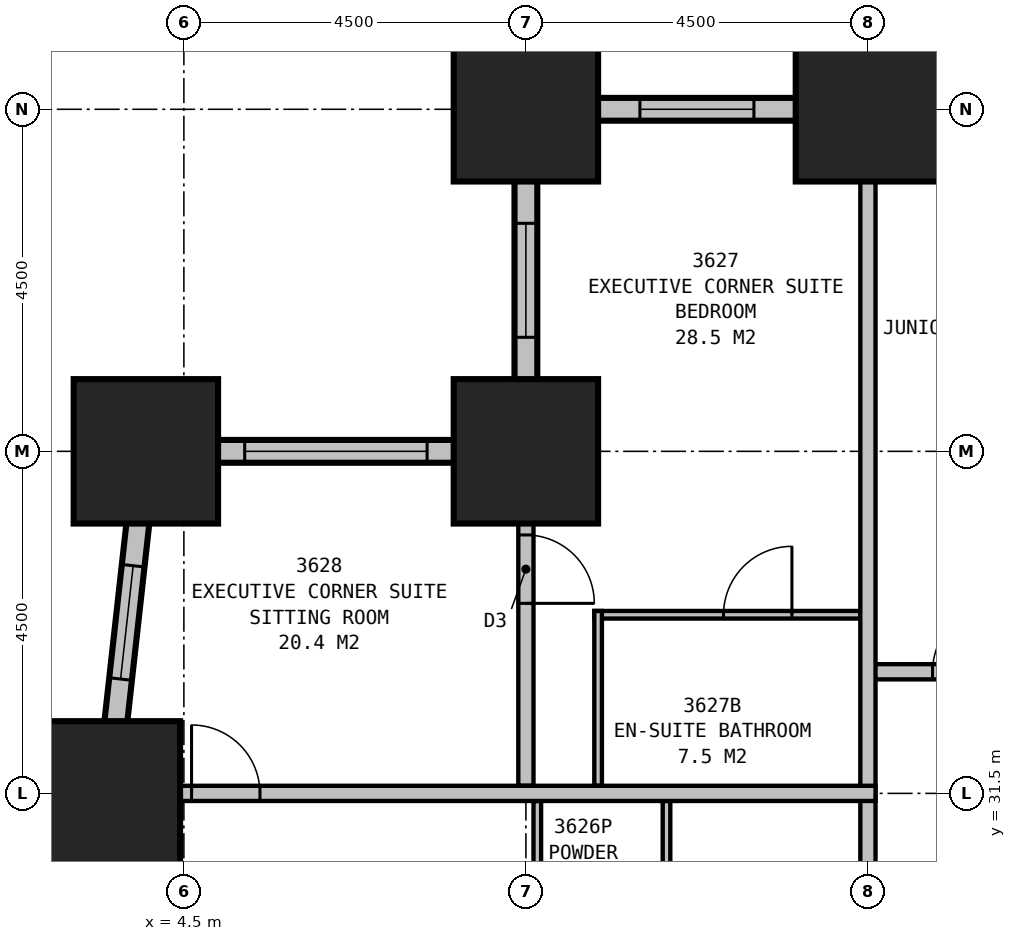
"""IFC4 building model, lengths in metres.
Left out: names, types, materials, properties, quantities, classifications, styles, units other than length and angle.
Written with IfcOpenShell. Run it as: python <this file> out.ifc"""

import sys

from ifc_helpers import new_model, si_unit, direction, frame, frame_2d, origin, origin_2d, place, context, subcontext, project, spatial, rectangle, extrude, element, fill, save


model = new_model("IFC4")
c1 = context("Model", 3, precision=1e-05, world=origin(), true_north=direction((0.0, 1.0)))
c2 = subcontext(c1, "Body", "Model", "MODEL_VIEW")
j1 = project(units=[si_unit("LENGTHUNIT", "METRE"), si_unit("PLANEANGLEUNIT", "RADIAN")], contexts=[c1])
p1 = place(None, origin())
s1 = spatial("IfcSite", under=j1, at=p1, CompositionType="ELEMENT")
p2 = place(p1, origin())
s2 = spatial("IfcBuilding", under=s1, at=p2, CompositionType="ELEMENT")
p3 = place(p2, frame((0.0, 0.0, 138.9)))
s3 = spatial("IfcBuildingStorey", under=s2, at=p3, CompositionType="ELEMENT", Elevation=138.9)
for number, where, z_axis, x_axis in (
    (1, (13.5, 40.5, 0.0), (0.0, 0.0, 1.0), (1.0, 0.0, 0.0)),
    (2, (9.0, 40.5, 0.0), (0.0, 0.0, 1.0), (1.0, 0.0, 0.0)),
    (3, (9.0, 36.0, 0.0), (0.0, 0.0, 1.0), (1.0, 0.0, 0.0)),
    (4, (4.0, 36.0, 0.0), (0.0, 0.0, 1.0), (1.0, 0.0, 0.0)),
    (5, (3.5, 31.5, 0.0), (0.0, 0.0, 1.0), (1.0, 0.0, 0.0)),
):
    element("IfcColumn", number, at=place(p3, frame(where, z_axis=z_axis, x_axis=x_axis)), inside=s3, PredefinedType="COLUMN", context=c2, shape_type="SweptSolid", body=[
        extrude(rectangle(XDim=1.9, YDim=1.9, at=origin_2d()), origin(), (0.0, 0.0, 1.0), 3.5),
    ])
p4 = place(p3, frame((40.65, 40.5, 0.0), z_axis=(0.0, 0.0, 1.0), x_axis=(-1.0, 0.0, 0.0)))
e6 = element("IfcWall", 6, at=p4, inside=s3, PredefinedType="STANDARD", context=c2, shape_type="SweptSolid", body=[
    extrude(rectangle(XDim=31.8, YDim=0.3, at=frame_2d((15.9, 0.0))), origin(), (0.0, 0.0, 1.0), 2.15),
])
p5 = place(p4, frame((1.65, 0.0, 0.5)))
e7 = element("IfcOpeningElement", 7, at=p5, cuts=e6, PredefinedType="OPENING", context=c2, shape_type="SweptSolid", body=[
    extrude(rectangle(XDim=1.5, YDim=1.5, at=frame_2d((0.75, 0.75))), frame((0.0, 0.16, 0.0), z_axis=(0.0, -1.0, 0.0), x_axis=(1.0, 0.0, 0.0)), (0.0, 0.0, 1.0), 0.32),
])
p6 = place(p4, frame((6.15, 0.0, 0.5)))
e8 = element("IfcOpeningElement", 8, at=p6, cuts=e6, PredefinedType="OPENING", context=c2, shape_type="SweptSolid", body=[
    extrude(rectangle(XDim=1.5, YDim=1.5, at=frame_2d((0.75, 0.75))), frame((0.0, 0.16, 0.0), z_axis=(0.0, -1.0, 0.0), x_axis=(1.0, 0.0, 0.0)), (0.0, 0.0, 1.0), 0.32),
])
p7 = place(p4, frame((10.65, 0.0, 0.5)))
e9 = element("IfcOpeningElement", 9, at=p7, cuts=e6, PredefinedType="OPENING", context=c2, shape_type="SweptSolid", body=[
    extrude(rectangle(XDim=1.5, YDim=1.5, at=frame_2d((0.75, 0.75))), frame((0.0, 0.16, 0.0), z_axis=(0.0, -1.0, 0.0), x_axis=(1.0, 0.0, 0.0)), (0.0, 0.0, 1.0), 0.32),
])
p8 = place(p4, frame((15.15, 0.0, 0.5)))
e10 = element("IfcOpeningElement", 10, at=p8, cuts=e6, PredefinedType="OPENING", context=c2, shape_type="SweptSolid", body=[
    extrude(rectangle(XDim=1.5, YDim=1.5, at=frame_2d((0.75, 0.75))), frame((0.0, 0.16, 0.0), z_axis=(0.0, -1.0, 0.0), x_axis=(1.0, 0.0, 0.0)), (0.0, 0.0, 1.0), 0.32),
])
p9 = place(p4, frame((19.65, 0.0, 0.5)))
e11 = element("IfcOpeningElement", 11, at=p9, cuts=e6, PredefinedType="OPENING", context=c2, shape_type="SweptSolid", body=[
    extrude(rectangle(XDim=1.5, YDim=1.5, at=frame_2d((0.75, 0.75))), frame((0.0, 0.16, 0.0), z_axis=(0.0, -1.0, 0.0), x_axis=(1.0, 0.0, 0.0)), (0.0, 0.0, 1.0), 0.32),
])
p10 = place(p4, frame((24.15, 0.0, 0.5)))
e12 = element("IfcOpeningElement", 12, at=p10, cuts=e6, PredefinedType="OPENING", context=c2, shape_type="SweptSolid", body=[
    extrude(rectangle(XDim=1.5, YDim=1.5, at=frame_2d((0.75, 0.75))), frame((0.0, 0.16, 0.0), z_axis=(0.0, -1.0, 0.0), x_axis=(1.0, 0.0, 0.0)), (0.0, 0.0, 1.0), 0.32),
])
p11 = place(p4, frame((28.65, 0.0, 0.5)))
e13 = element("IfcOpeningElement", 13, at=p11, cuts=e6, PredefinedType="OPENING", context=c2, shape_type="SweptSolid", body=[
    extrude(rectangle(XDim=1.5, YDim=1.5, at=frame_2d((0.75, 0.75))), frame((0.0, 0.16, 0.0), z_axis=(0.0, -1.0, 0.0), x_axis=(1.0, 0.0, 0.0)), (0.0, 0.0, 1.0), 0.32),
])
p12 = place(p3, frame((9.0, 40.65, 0.0), z_axis=(0.0, 0.0, 1.0), x_axis=(0.0, -1.0, 0.0)))
e14 = element("IfcWall", 14, at=p12, inside=s3, PredefinedType="STANDARD", context=c2, shape_type="SweptSolid", body=[
    extrude(rectangle(XDim=4.8, YDim=0.3, at=frame_2d((2.4, 0.0))), origin(), (0.0, 0.0, 1.0), 2.15),
])
p13 = place(p12, frame((1.65, 0.0, 0.5)))
e15 = element("IfcOpeningElement", 15, at=p13, cuts=e14, PredefinedType="OPENING", context=c2, shape_type="SweptSolid", body=[
    extrude(rectangle(XDim=1.5, YDim=1.5, at=frame_2d((0.75, 0.75))), frame((0.0, 0.16, 0.0), z_axis=(0.0, -1.0, 0.0), x_axis=(1.0, 0.0, 0.0)), (0.0, 0.0, 1.0), 0.32),
])
p14 = place(p3, frame((9.15, 36.0, 0.0), z_axis=(0.0, 0.0, 1.0), x_axis=(-1.0, 0.0, 0.0)))
e16 = element("IfcWall", 16, at=p14, inside=s3, PredefinedType="STANDARD", context=c2, shape_type="SweptSolid", body=[
    extrude(rectangle(XDim=5.3, YDim=0.3, at=frame_2d((2.65, 0.0))), origin(), (0.0, 0.0, 1.0), 2.15),
])
p15 = place(p14, frame((1.45, 0.0, 0.5)))
e17 = element("IfcOpeningElement", 17, at=p15, cuts=e16, PredefinedType="OPENING", context=c2, shape_type="SweptSolid", body=[
    extrude(rectangle(XDim=2.4, YDim=1.5, at=frame_2d((1.2, 0.75))), frame((0.0, 0.16, 0.0), z_axis=(0.0, -1.0, 0.0), x_axis=(1.0, 0.0, 0.0)), (0.0, 0.0, 1.0), 0.32),
])
p16 = place(p3, frame((4.017, 36.149, 0.0), z_axis=(0.0, 0.0, 1.0), x_axis=(-0.110433201132, -0.993883548555, 0.0)))
e18 = element("IfcWall", 18, at=p16, inside=s3, PredefinedType="STANDARD", context=c2, shape_type="SweptSolid", body=[
    extrude(rectangle(XDim=31.994, YDim=0.3, at=frame_2d((15.997, 0.0))), origin(), (0.0, 0.0, 1.0), 2.15),
])
p17 = place(p16, frame((1.664, 0.0, 0.5)))
e19 = element("IfcOpeningElement", 19, at=p17, cuts=e18, PredefinedType="OPENING", context=c2, shape_type="SweptSolid", body=[
    extrude(rectangle(XDim=1.5, YDim=1.5, at=frame_2d((0.75, 0.75))), frame((0.0, 0.16, 0.0), z_axis=(0.0, -1.0, 0.0), x_axis=(1.0, 0.0, 0.0)), (0.0, 0.0, 1.0), 0.32),
])
p18 = place(p16, frame((6.192, 0.0, 0.5)))
e20 = element("IfcOpeningElement", 20, at=p18, cuts=e18, PredefinedType="OPENING", context=c2, shape_type="SweptSolid", body=[
    extrude(rectangle(XDim=1.5, YDim=1.5, at=frame_2d((0.75, 0.75))), frame((0.0, 0.16, 0.0), z_axis=(0.0, -1.0, 0.0), x_axis=(1.0, 0.0, 0.0)), (0.0, 0.0, 1.0), 0.32),
])
p19 = place(p16, frame((10.719, 0.0, 0.5)))
e21 = element("IfcOpeningElement", 21, at=p19, cuts=e18, PredefinedType="OPENING", context=c2, shape_type="SweptSolid", body=[
    extrude(rectangle(XDim=1.5, YDim=1.5, at=frame_2d((0.75, 0.75))), frame((0.0, 0.16, 0.0), z_axis=(0.0, -1.0, 0.0), x_axis=(1.0, 0.0, 0.0)), (0.0, 0.0, 1.0), 0.32),
])
p20 = place(p16, frame((15.247, 0.0, 0.5)))
e22 = element("IfcOpeningElement", 22, at=p20, cuts=e18, PredefinedType="OPENING", context=c2, shape_type="SweptSolid", body=[
    extrude(rectangle(XDim=1.5, YDim=1.5, at=frame_2d((0.75, 0.75))), frame((0.0, 0.16, 0.0), z_axis=(0.0, -1.0, 0.0), x_axis=(1.0, 0.0, 0.0)), (0.0, 0.0, 1.0), 0.32),
])
p21 = place(p16, frame((19.775, 0.0, 0.5)))
e23 = element("IfcOpeningElement", 23, at=p21, cuts=e18, PredefinedType="OPENING", context=c2, shape_type="SweptSolid", body=[
    extrude(rectangle(XDim=1.5, YDim=1.5, at=frame_2d((0.75, 0.75))), frame((0.0, 0.16, 0.0), z_axis=(0.0, -1.0, 0.0), x_axis=(1.0, 0.0, 0.0)), (0.0, 0.0, 1.0), 0.32),
])
p22 = place(p16, frame((24.302, 0.0, 0.5)))
e24 = element("IfcOpeningElement", 24, at=p22, cuts=e18, PredefinedType="OPENING", context=c2, shape_type="SweptSolid", body=[
    extrude(rectangle(XDim=1.5, YDim=1.5, at=frame_2d((0.75, 0.75))), frame((0.0, 0.16, 0.0), z_axis=(0.0, -1.0, 0.0), x_axis=(1.0, 0.0, 0.0)), (0.0, 0.0, 1.0), 0.32),
])
p23 = place(p16, frame((28.83, 0.0, 0.5)))
e25 = element("IfcOpeningElement", 25, at=p23, cuts=e18, PredefinedType="OPENING", context=c2, shape_type="SweptSolid", body=[
    extrude(rectangle(XDim=1.5, YDim=1.5, at=frame_2d((0.75, 0.75))), frame((0.0, 0.16, 0.0), z_axis=(0.0, -1.0, 0.0), x_axis=(1.0, 0.0, 0.0)), (0.0, 0.0, 1.0), 0.32),
])
p24 = place(p3, frame((13.5, 33.1, 0.0), z_axis=(0.0, 0.0, 1.0), x_axis=(1.0, 0.0, 0.0)))
e26 = element("IfcWall", 26, at=p24, inside=s3, PredefinedType="PARTITIONING", context=c2, shape_type="SweptSolid", body=[
    extrude(rectangle(XDim=22.5, YDim=0.2, at=frame_2d((11.25, 0.0))), origin(), (0.0, 0.0, 1.0), 3.25),
])
p25 = place(p24, frame((0.85, 0.0, 0.0)))
e27 = element("IfcOpeningElement", 27, at=p25, cuts=e26, PredefinedType="OPENING", context=c2, shape_type="SweptSolid", body=[
    extrude(rectangle(XDim=0.9, YDim=2.1, at=frame_2d((0.45, 1.05))), frame((0.0, 0.11, 0.0), z_axis=(0.0, -1.0, 0.0), x_axis=(1.0, 0.0, 0.0)), (0.0, 0.0, 1.0), 0.22),
])
p26 = place(p24, frame((10.7, 0.0, 0.0)))
e28 = element("IfcOpeningElement", 28, at=p26, cuts=e26, PredefinedType="OPENING", context=c2, shape_type="SweptSolid", body=[
    extrude(rectangle(XDim=1.0, YDim=2.1, at=frame_2d((0.5, 1.05))), frame((0.0, 0.11, 0.0), z_axis=(0.0, -1.0, 0.0), x_axis=(1.0, 0.0, 0.0)), (0.0, 0.0, 1.0), 0.22),
])
p27 = place(p24, frame((15.15, 0.0, 0.0)))
e29 = element("IfcOpeningElement", 29, at=p27, cuts=e26, PredefinedType="OPENING", context=c2, shape_type="SweptSolid", body=[
    extrude(rectangle(XDim=0.9, YDim=2.1, at=frame_2d((0.45, 1.05))), frame((0.0, 0.11, 0.0), z_axis=(0.0, -1.0, 0.0), x_axis=(1.0, 0.0, 0.0)), (0.0, 0.0, 1.0), 0.22),
])
p28 = place(p3, frame((13.5, 29.3, 0.0), z_axis=(0.0, 0.0, 1.0), x_axis=(0.0, 1.0, 0.0)))
e30 = element("IfcWall", 30, at=p28, inside=s3, PredefinedType="PARTITIONING", context=c2, shape_type="SweptSolid", body=[
    extrude(rectangle(XDim=11.2, YDim=0.2, at=frame_2d((5.6, 0.0))), origin(), (0.0, 0.0, 1.0), 2.25),
])
p29 = place(p3, frame((13.6, 31.5, 0.0), z_axis=(0.0, 0.0, 1.0), x_axis=(-1.0, 0.0, 0.0)))
e31 = element("IfcWall", 31, at=p29, inside=s3, PredefinedType="PARTITIONING", context=c2, shape_type="SweptSolid", body=[
    extrude(rectangle(XDim=10.099, YDim=0.2, at=frame_2d((5.05, 0.0))), origin(), (0.0, 0.0, 1.0), 3.25),
])
p30 = place(p29, frame((8.999, 0.0, 0.0), z_axis=(0.0, 0.0, 1.0), x_axis=(-1.0, 0.0, 0.0)))
e32 = element("IfcOpeningElement", 32, at=p30, cuts=e31, PredefinedType="OPENING", context=c2, shape_type="SweptSolid", body=[
    extrude(rectangle(XDim=0.9, YDim=2.1, at=frame_2d((0.45, 1.05))), frame((0.0, 0.11, 0.0), z_axis=(0.0, -1.0, 0.0), x_axis=(1.0, 0.0, 0.0)), (0.0, 0.0, 1.0), 0.22),
])
p31 = place(p3, frame((9.15, 31.4, 0.0), z_axis=(0.0, 0.0, 1.0), x_axis=(0.0, -1.0, 0.0)))
e33 = element("IfcWall", 33, at=p31, inside=s3, PredefinedType="PLUMBINGWALL", context=c2, shape_type="SweptSolid", body=[
    extrude(rectangle(XDim=2.0, YDim=0.1, at=frame_2d((1.0, 0.0))), origin(), (0.0, 0.0, 1.0), 2.25),
])
p32 = place(p3, frame((10.85, 31.4, 0.0), z_axis=(0.0, 0.0, 1.0), x_axis=(0.0, -1.0, 0.0)))
e34 = element("IfcWall", 34, at=p32, inside=s3, PredefinedType="PLUMBINGWALL", context=c2, shape_type="SweptSolid", body=[
    extrude(rectangle(XDim=2.0, YDim=0.1, at=frame_2d((1.0, 0.0))), origin(), (0.0, 0.0, 1.0), 3.25),
])
p33 = place(p3, frame((9.0, 31.6, 0.0), z_axis=(0.0, 0.0, 1.0), x_axis=(0.0, 1.0, 0.0)))
e35 = element("IfcWall", 35, at=p33, inside=s3, PredefinedType="PARTITIONING", context=c2, shape_type="SweptSolid", body=[
    extrude(rectangle(XDim=4.4, YDim=0.2, at=frame_2d((2.2, 0.0))), origin(), (0.0, 0.0, 1.0), 2.25),
])
p34 = place(p33, frame((3.3, 0.0, 0.0), z_axis=(0.0, 0.0, 1.0), x_axis=(-1.0, 0.0, 0.0)))
e36 = element("IfcOpeningElement", 36, at=p34, cuts=e35, PredefinedType="OPENING", context=c2, shape_type="SweptSolid", body=[
    extrude(rectangle(XDim=0.9, YDim=2.1, at=frame_2d((0.45, 1.05))), frame((0.0, 0.11, 0.0), z_axis=(0.0, -1.0, 0.0), x_axis=(1.0, 0.0, 0.0)), (0.0, 0.0, 1.0), 0.22),
])
p35 = place(p3, frame((9.95, 31.6, 0.0), z_axis=(0.0, 0.0, 1.0), x_axis=(0.0, 1.0, 0.0)))
e37 = element("IfcWall", 37, at=p35, inside=s3, PredefinedType="PLUMBINGWALL", context=c2, shape_type="SweptSolid", body=[
    extrude(rectangle(XDim=2.3, YDim=0.1, at=frame_2d((1.15, 0.0))), origin(), (0.0, 0.0, 1.0), 3.25),
])
p36 = place(p3, frame((13.4, 33.85, 0.0), z_axis=(0.0, 0.0, 1.0), x_axis=(-1.0, 0.0, 0.0)))
e38 = element("IfcWall", 38, at=p36, inside=s3, PredefinedType="PLUMBINGWALL", context=c2, shape_type="SweptSolid", body=[
    extrude(rectangle(XDim=3.5, YDim=0.1, at=frame_2d((1.75, 0.0))), origin(), (0.0, 0.0, 1.0), 3.25),
])
p37 = place(p36, frame((1.8, 0.0, 0.0), z_axis=(0.0, 0.0, 1.0), x_axis=(-1.0, 0.0, 0.0)))
e39 = element("IfcOpeningElement", 39, at=p37, cuts=e38, PredefinedType="OPENING", context=c2, shape_type="SweptSolid", body=[
    extrude(rectangle(XDim=0.9, YDim=2.1, at=frame_2d((0.45, 1.05))), frame((0.0, 0.06, 0.0), z_axis=(0.0, -1.0, 0.0), x_axis=(1.0, 0.0, 0.0)), (0.0, 0.0, 1.0), 0.12),
])
p38 = place(p11, origin())
e40 = element("IfcWindow", 40, at=p38, inside=s3, PartitioningType="SINGLE_PANEL", PredefinedType="WINDOW", context=c2, shape_type="SweptSolid", body=[
    extrude(rectangle(XDim=1.5, YDim=1.5, at=frame_2d((0.75, 0.75))), frame((0.0, 0.03, 0.0), z_axis=(0.0, -1.0, 0.0), x_axis=(1.0, 0.0, 0.0)), (0.0, 0.0, 1.0), 0.06),
])
fill(e13, e40)
p39 = place(p13, origin())
e41 = element("IfcWindow", 41, at=p39, inside=s3, PartitioningType="SINGLE_PANEL", PredefinedType="WINDOW", context=c2, shape_type="SweptSolid", body=[
    extrude(rectangle(XDim=1.5, YDim=1.5, at=frame_2d((0.75, 0.75))), frame((0.0, 0.03, 0.0), z_axis=(0.0, -1.0, 0.0), x_axis=(1.0, 0.0, 0.0)), (0.0, 0.0, 1.0), 0.06),
])
fill(e15, e41)
p40 = place(p15, origin())
e42 = element("IfcWindow", 42, at=p40, inside=s3, PartitioningType="SINGLE_PANEL", PredefinedType="WINDOW", context=c2, shape_type="SweptSolid", body=[
    extrude(rectangle(XDim=2.4, YDim=1.5, at=frame_2d((1.2, 0.75))), frame((0.0, 0.03, 0.0), z_axis=(0.0, -1.0, 0.0), x_axis=(1.0, 0.0, 0.0)), (0.0, 0.0, 1.0), 0.06),
])
fill(e17, e42)
p41 = place(p17, origin())
e43 = element("IfcWindow", 43, at=p41, inside=s3, PartitioningType="SINGLE_PANEL", PredefinedType="WINDOW", context=c2, shape_type="SweptSolid", body=[
    extrude(rectangle(XDim=1.5, YDim=1.5, at=frame_2d((0.75, 0.75))), frame((0.0, 0.03, 0.0), z_axis=(0.0, -1.0, 0.0), x_axis=(1.0, 0.0, 0.0)), (0.0, 0.0, 1.0), 0.06),
])
fill(e19, e43)
p42 = place(p25, origin())
e44 = element("IfcDoor", 44, at=p42, inside=s3, OperationType="SINGLE_SWING_RIGHT", PredefinedType="DOOR", context=c2, shape_type="SweptSolid", body=[
    extrude(rectangle(XDim=0.9, YDim=2.1, at=frame_2d((0.45, 1.05))), frame((0.0, 0.025, 0.0), z_axis=(0.0, -1.0, 0.0), x_axis=(1.0, 0.0, 0.0)), (0.0, 0.0, 1.0), 0.05),
])
fill(e27, e44)
p43 = place(p30, origin())
e45 = element("IfcDoor", 45, at=p43, inside=s3, OperationType="SINGLE_SWING_LEFT", PredefinedType="DOOR", context=c2, shape_type="SweptSolid", body=[
    extrude(rectangle(XDim=0.9, YDim=2.1, at=frame_2d((0.45, 1.05))), frame((0.0, 0.025, 0.0), z_axis=(0.0, -1.0, 0.0), x_axis=(1.0, 0.0, 0.0)), (0.0, 0.0, 1.0), 0.05),
])
fill(e32, e45)
p44 = place(p34, origin())
e46 = element("IfcDoor", 46, at=p44, inside=s3, OperationType="SINGLE_SWING_RIGHT", PredefinedType="DOOR", context=c2, shape_type="SweptSolid", body=[
    extrude(rectangle(XDim=0.9, YDim=2.1, at=frame_2d((0.45, 1.05))), frame((0.0, 0.025, 0.0), z_axis=(0.0, -1.0, 0.0), x_axis=(1.0, 0.0, 0.0)), (0.0, 0.0, 1.0), 0.05),
])
fill(e36, e46)
p45 = place(p37, origin())
e47 = element("IfcDoor", 47, at=p45, inside=s3, OperationType="SINGLE_SWING_RIGHT", PredefinedType="DOOR", context=c2, shape_type="SweptSolid", body=[
    extrude(rectangle(XDim=0.9, YDim=2.1, at=frame_2d((0.45, 1.05))), frame((0.0, 0.025, 0.0), z_axis=(0.0, -1.0, 0.0), x_axis=(1.0, 0.0, 0.0)), (0.0, 0.0, 1.0), 0.05),
])
fill(e39, e47)
save(model, sys.argv[1])
